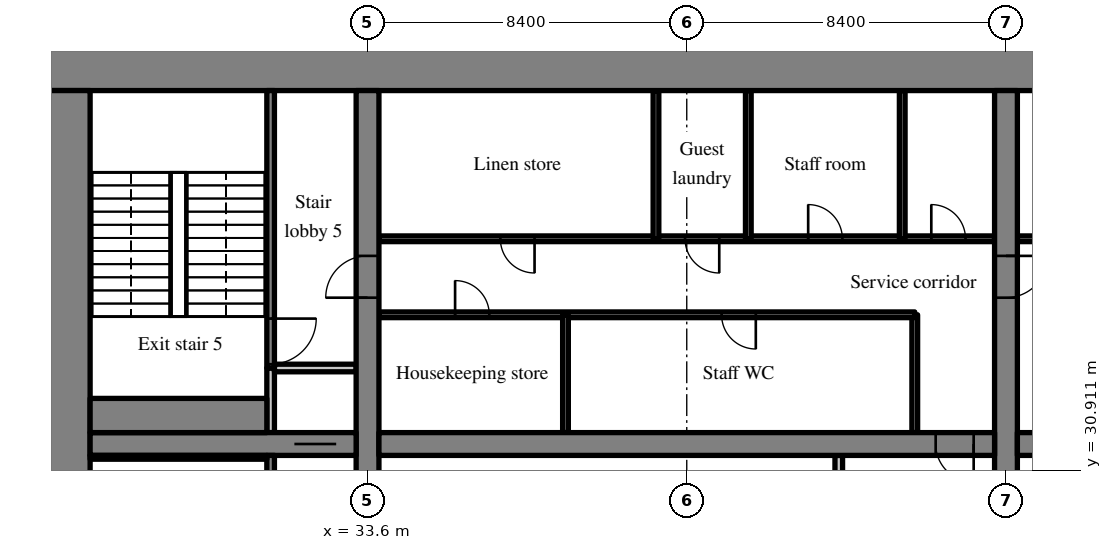
"""IFC4 building model, lengths in metres.
Left out: names, types, materials, properties, quantities, classifications, styles, units other than length and angle.
Written with IfcOpenShell. Run it as: python <this file> out.ifc"""

import sys

from ifc_helpers import new_model, si_unit, direction, frame, frame_2d, origin, place, context, subcontext, project, spatial, rectangle, extrude, source, transform, mapped, element, fill, save


model = new_model("IFC4")
c1 = context("Model", 3, precision=1e-05, world=origin(), true_north=direction((0.0, 1.0)))
c2 = subcontext(c1, "Body", "Model", "MODEL_VIEW")
j1 = project(units=[si_unit("LENGTHUNIT", "METRE"), si_unit("PLANEANGLEUNIT", "RADIAN")], contexts=[c1])
p1 = place(None, origin())
s1 = spatial("IfcSite", under=j1, at=p1, CompositionType="ELEMENT")
p2 = place(p1, origin())
s2 = spatial("IfcBuilding", under=s1, at=p2, CompositionType="ELEMENT")
p3 = place(p2, frame((0.0, 0.0, 11.4)))
s3 = spatial("IfcBuildingStorey", under=s2, at=p3, CompositionType="ELEMENT", Elevation=11.4)
m1 = source(origin(), c2, "Body", "SweptSolid", [
    extrude(rectangle(XDim=50.4, YDim=1.1, at=frame_2d((25.2, 0.0))), origin(), (0.0, 0.0, 1.0), 6.32),
])
p4 = place(p3, frame((25.2, 41.45, 0.0), z_axis=(0.0, 0.0, 1.0), x_axis=(1.0, 0.0, 0.0)))
e1 = element("IfcWall", 1, at=p4, inside=s3, PredefinedType="SHEAR", context=c2, shape_type="MappedRepresentation", body=[
    mapped(m1, transform((0.0, 0.0, 0.0), scale=1.0)),
])
m2 = source(origin(), c2, "Body", "SweptSolid", [
    extrude(rectangle(XDim=17.8, YDim=1.1, at=frame_2d((8.9, 0.0))), origin(), (0.0, 0.0, 1.0), 6.32),
])
p5 = place(p3, frame((25.75, 23.1, 0.0), z_axis=(0.0, 0.0, 1.0), x_axis=(0.0, 1.0, 0.0)))
e2 = element("IfcWall", 2, at=p5, inside=s3, PredefinedType="SHEAR", context=c2, shape_type="MappedRepresentation", body=[
    mapped(m2, transform((0.0, 0.0, 0.0), scale=1.0)),
])
m3 = source(origin(), c2, "Body", "SweptSolid", [
    extrude(rectangle(XDim=17.8, YDim=0.6, at=frame_2d((8.9, 0.0))), origin(), (0.0, 0.0, 1.0), 6.32),
])
p6 = place(p3, frame((33.6, 23.1, 0.0), z_axis=(0.0, 0.0, 1.0), x_axis=(0.0, 1.0, 0.0)))
e3 = element("IfcWall", 3, at=p6, inside=s3, PredefinedType="SHEAR", context=c2, shape_type="MappedRepresentation", body=[
    mapped(m3, transform((0.0, 0.0, 0.0), scale=1.0)),
])
m4 = source(origin(), c2, "Body", "SweptSolid", [
    extrude(rectangle(XDim=1.1, YDim=2.1, at=frame_2d((0.55, 1.05))), frame((0.0, 0.31, 0.0), z_axis=(0.0, -1.0, 0.0), x_axis=(1.0, 0.0, 0.0)), (0.0, 0.0, 1.0), 0.62),
])
p7 = place(p6, frame((12.35, 0.0, 0.0)))
e4 = element("IfcOpeningElement", 4, at=p7, cuts=e3, PredefinedType="OPENING", context=c2, shape_type="MappedRepresentation", body=[
    mapped(m4, transform((0.0, 0.0, 0.0), scale=1.0)),
])
p8 = place(p3, frame((50.4, 23.1, 0.0), z_axis=(0.0, 0.0, 1.0), x_axis=(0.0, 1.0, 0.0)))
e5 = element("IfcWall", 5, at=p8, inside=s3, PredefinedType="SHEAR", context=c2, shape_type="MappedRepresentation", body=[
    mapped(m3, transform((0.0, 0.0, 0.0), scale=1.0)),
])
p9 = place(p8, frame((12.35, 0.0, 0.0)))
e6 = element("IfcOpeningElement", 6, at=p9, cuts=e5, PredefinedType="OPENING", context=c2, shape_type="MappedRepresentation", body=[
    mapped(m4, transform((0.0, 0.0, 0.0), scale=1.0)),
])
m5 = source(origin(), c2, "Body", "SweptSolid", [
    extrude(rectangle(XDim=7.0, YDim=0.6, at=frame_2d((3.5, 0.0))), origin(), (0.0, 0.0, 1.0), 6.32),
])
p10 = place(p3, frame((26.3, 31.6, 0.0), z_axis=(0.0, 0.0, 1.0), x_axis=(1.0, 0.0, 0.0)))
e7 = element("IfcWall", 7, at=p10, inside=s3, PredefinedType="SHEAR", context=c2, shape_type="MappedRepresentation", body=[
    mapped(m5, transform((0.0, 0.0, 0.0), scale=1.0)),
])
p11 = place(p10, frame((5.375, 0.0, 0.0)))
e8 = element("IfcOpeningElement", 8, at=p11, cuts=e7, PredefinedType="OPENING", context=c2, shape_type="MappedRepresentation", body=[
    mapped(m4, transform((0.0, 0.0, 0.0), scale=1.0)),
])
m6 = source(origin(), c2, "Body", "SweptSolid", [
    extrude(rectangle(XDim=16.2, YDim=0.6, at=frame_2d((8.1, 0.0))), origin(), (0.0, 0.0, 1.0), 6.32),
])
p12 = place(p3, frame((33.9, 31.6, 0.0), z_axis=(0.0, 0.0, 1.0), x_axis=(1.0, 0.0, 0.0)))
e9 = element("IfcWall", 9, at=p12, inside=s3, PredefinedType="SHEAR", context=c2, shape_type="MappedRepresentation", body=[
    mapped(m6, transform((0.0, 0.0, 0.0), scale=1.0)),
])
m7 = source(origin(), c2, "Body", "SweptSolid", [
    extrude(rectangle(XDim=1.0, YDim=2.1, at=frame_2d((0.5, 1.05))), frame((0.0, 0.31, 0.0), z_axis=(0.0, -1.0, 0.0), x_axis=(1.0, 0.0, 0.0)), (0.0, 0.0, 1.0), 0.62),
])
p13 = place(p12, frame((14.65, 0.0, 0.0)))
e10 = element("IfcOpeningElement", 10, at=p13, cuts=e9, PredefinedType="OPENING", context=c2, shape_type="MappedRepresentation", body=[
    mapped(m7, transform((0.0, 0.0, 0.0), scale=1.0)),
])
m8 = source(origin(), c2, "Body", "SweptSolid", [
    extrude(rectangle(XDim=16.2, YDim=0.6, at=frame_2d((8.1, 0.0))), origin(), (0.0, 0.0, 1.0), 6.32),
])
p14 = place(p3, frame((50.7, 31.6, 0.0), z_axis=(0.0, 0.0, 1.0), x_axis=(1.0, 0.0, 0.0)))
e11 = element("IfcWall", 11, at=p14, inside=s3, PredefinedType="SHEAR", context=c2, shape_type="MappedRepresentation", body=[
    mapped(m8, transform((0.0, 0.0, 0.0), scale=1.0)),
])
p15 = place(p14, frame((0.55, 0.0, 0.0)))
e12 = element("IfcOpeningElement", 12, at=p15, cuts=e11, PredefinedType="OPENING", context=c2, shape_type="MappedRepresentation", body=[
    mapped(m7, transform((0.0, 0.0, 0.0), scale=1.0)),
])
m9 = source(origin(), c2, "Body", "SweptSolid", [
    extrude(rectangle(XDim=2.5, YDim=0.2, at=frame_2d((1.25, 0.0))), origin(), (0.0, 0.0, 1.0), 6.32),
])
p16 = place(p3, frame((46.0, 28.8, 0.0), z_axis=(0.0, 0.0, 1.0), x_axis=(0.0, 1.0, 0.0)))
e13 = element("IfcWall", 13, at=p16, inside=s3, PredefinedType="SOLIDWALL", context=c2, shape_type="MappedRepresentation", body=[
    mapped(m9, transform((0.0, 0.0, 0.0), scale=1.0)),
])
m10 = source(origin(), c2, "Body", "SweptSolid", [
    extrude(rectangle(XDim=3.1, YDim=0.15, at=frame_2d((1.55, 0.0))), origin(), (0.0, 0.0, 1.0), 6.32),
])
p17 = place(p3, frame((48.0, 31.9, 0.0), z_axis=(0.0, 0.0, 1.0), x_axis=(0.0, 1.0, 0.0)))
e14 = element("IfcWall", 14, at=p17, inside=s3, PredefinedType="PARTITIONING", context=c2, shape_type="MappedRepresentation", body=[
    mapped(m10, transform((0.0, 0.0, 0.0), scale=1.0)),
])
m11 = source(origin(), c2, "Body", "SweptSolid", [
    extrude(rectangle(XDim=14.1, YDim=0.15, at=frame_2d((7.05, 0.0))), origin(), (0.0, 0.0, 1.0), 6.32),
])
p18 = place(p3, frame((33.9, 35.0, 0.0), z_axis=(0.0, 0.0, 1.0), x_axis=(1.0, 0.0, 0.0)))
e15 = element("IfcWall", 15, at=p18, inside=s3, PredefinedType="PARTITIONING", context=c2, shape_type="MappedRepresentation", body=[
    mapped(m11, transform((0.0, 0.0, 0.0), scale=1.0)),
])
m12 = source(origin(), c2, "Body", "SweptSolid", [
    extrude(rectangle(XDim=0.9, YDim=2.1, at=frame_2d((0.45, 1.05))), frame((0.0, 0.085, 0.0), z_axis=(0.0, -1.0, 0.0), x_axis=(1.0, 0.0, 0.0)), (0.0, 0.0, 1.0), 0.17),
])
p19 = place(p18, frame((2.004, 0.0, 0.0)))
e16 = element("IfcOpeningElement", 16, at=p19, cuts=e15, PredefinedType="OPENING", context=c2, shape_type="MappedRepresentation", body=[
    mapped(m12, transform((0.0, 0.0, 0.0), scale=1.0)),
])
p20 = place(p18, frame((9.017, 0.0, 0.0)))
e17 = element("IfcOpeningElement", 17, at=p20, cuts=e15, PredefinedType="OPENING", context=c2, shape_type="MappedRepresentation", body=[
    mapped(m12, transform((0.0, 0.0, 0.0), scale=1.0)),
])
m13 = source(origin(), c2, "Body", "SweptSolid", [
    extrude(rectangle(XDim=16.2, YDim=0.15, at=frame_2d((8.1, 0.0))), origin(), (0.0, 0.0, 1.0), 6.32),
])
p21 = place(p3, frame((33.9, 37.0, 0.0), z_axis=(0.0, 0.0, 1.0), x_axis=(1.0, 0.0, 0.0)))
e18 = element("IfcWall", 18, at=p21, inside=s3, PredefinedType="PARTITIONING", context=c2, shape_type="MappedRepresentation", body=[
    mapped(m13, transform((0.0, 0.0, 0.0), scale=1.0)),
])
p22 = place(p21, frame((3.195, 0.0, 0.0)))
e19 = element("IfcOpeningElement", 19, at=p22, cuts=e18, PredefinedType="OPENING", context=c2, shape_type="MappedRepresentation", body=[
    mapped(m12, transform((0.0, 0.0, 0.0), scale=1.0)),
])
p23 = place(p21, frame((8.055, 0.0, 0.0)))
e20 = element("IfcOpeningElement", 20, at=p23, cuts=e18, PredefinedType="OPENING", context=c2, shape_type="MappedRepresentation", body=[
    mapped(m12, transform((0.0, 0.0, 0.0), scale=1.0)),
])
p24 = place(p21, frame((11.295, 0.0, 0.0)))
e21 = element("IfcOpeningElement", 21, at=p24, cuts=e18, PredefinedType="OPENING", context=c2, shape_type="MappedRepresentation", body=[
    mapped(m12, transform((0.0, 0.0, 0.0), scale=1.0)),
])
p25 = place(p21, frame((14.535, 0.0, 0.0)))
e22 = element("IfcOpeningElement", 22, at=p25, cuts=e18, PredefinedType="OPENING", context=c2, shape_type="MappedRepresentation", body=[
    mapped(m12, transform((0.0, 0.0, 0.0), scale=1.0)),
])
p26 = place(p3, frame((38.809, 31.9, 0.0), z_axis=(0.0, 0.0, 1.0), x_axis=(0.0, 1.0, 0.0)))
e23 = element("IfcWall", 23, at=p26, inside=s3, PredefinedType="PARTITIONING", context=c2, shape_type="MappedRepresentation", body=[
    mapped(m10, transform((0.0, 0.0, 0.0), scale=1.0)),
])
m14 = source(origin(), c2, "Body", "SweptSolid", [
    extrude(rectangle(XDim=3.9, YDim=0.15, at=frame_2d((1.95, 0.0))), origin(), (0.0, 0.0, 1.0), 6.32),
])
for number, where, z_axis, x_axis in (
    (24, (41.19, 37.0, 0.0), (0.0, 0.0, 1.0), (0.0, 1.0, 0.0)),
    (25, (43.62, 37.0, 0.0), (0.0, 0.0, 1.0), (0.0, 1.0, 0.0)),
    (26, (47.67, 37.0, 0.0), (0.0, 0.0, 1.0), (0.0, 1.0, 0.0)),
):
    element("IfcWall", number, at=place(p3, frame(where, z_axis=z_axis, x_axis=x_axis)), inside=s3, PredefinedType="PARTITIONING", context=c2, shape_type="MappedRepresentation", body=[
        mapped(m14, transform((0.0, 0.0, 0.0), scale=1.0)),
    ])
m15 = source(origin(), c2, "Body", "SweptSolid", [
    extrude(rectangle(XDim=16.2, YDim=0.15, at=frame_2d((8.1, 0.0))), origin(), (0.0, 0.0, 1.0), 6.32),
])
p27 = place(p3, frame((66.9, 37.0, 0.0), z_axis=(0.0, 0.0, 1.0), x_axis=(-1.0, 0.0, 0.0)))
e27 = element("IfcWall", 27, at=p27, inside=s3, PredefinedType="PARTITIONING", context=c2, shape_type="MappedRepresentation", body=[
    mapped(m15, transform((0.0, 0.0, 0.0), scale=1.0)),
])
p28 = place(p27, frame((0.765, 0.0, 0.0)))
e28 = element("IfcOpeningElement", 28, at=p28, cuts=e27, PredefinedType="OPENING", context=c2, shape_type="MappedRepresentation", body=[
    mapped(m12, transform((0.0, 0.0, 0.0), scale=1.0)),
])
p29 = place(p27, frame((3.6, 0.0, 0.0)))
e29 = element("IfcOpeningElement", 29, at=p29, cuts=e27, PredefinedType="OPENING", context=c2, shape_type="MappedRepresentation", body=[
    mapped(m12, transform((0.0, 0.0, 0.0), scale=1.0)),
])
p30 = place(p27, frame((9.27, 0.0, 0.0)))
e30 = element("IfcOpeningElement", 30, at=p30, cuts=e27, PredefinedType="OPENING", context=c2, shape_type="MappedRepresentation", body=[
    mapped(m12, transform((0.0, 0.0, 0.0), scale=1.0)),
])
p31 = place(p27, frame((14.535, 0.0, 0.0)))
e31 = element("IfcOpeningElement", 31, at=p31, cuts=e27, PredefinedType="OPENING", context=c2, shape_type="MappedRepresentation", body=[
    mapped(m12, transform((0.0, 0.0, 0.0), scale=1.0)),
])
m16 = source(origin(), c2, "Body", "SweptSolid", [
    extrude(rectangle(XDim=8.2, YDim=0.2, at=frame_2d((4.1, 0.0))), origin(), (0.0, 0.0, 1.0), 6.32),
])
p32 = place(p3, frame((31.05, 23.1, 0.0), z_axis=(0.0, 0.0, 1.0), x_axis=(0.0, 1.0, 0.0)))
e32 = element("IfcWall", 32, at=p32, inside=s3, PredefinedType="SOLIDWALL", context=c2, shape_type="MappedRepresentation", body=[
    mapped(m16, transform((0.0, 0.0, 0.0), scale=1.0)),
])
m17 = source(origin(), c2, "Body", "SweptSolid", [
    extrude(rectangle(XDim=1.2, YDim=2.1, at=frame_2d((0.6, 1.05))), frame((0.0, 0.11, 0.0), z_axis=(0.0, -1.0, 0.0), x_axis=(1.0, 0.0, 0.0)), (0.0, 0.0, 1.0), 0.22),
])
p33 = place(p32, frame((0.5, 0.0, 0.0)))
e33 = element("IfcOpeningElement", 33, at=p33, cuts=e32, PredefinedType="OPENING", context=c2, shape_type="MappedRepresentation", body=[
    mapped(m17, transform((0.0, 0.0, 0.0), scale=1.0)),
])
m18 = source(origin(), c2, "Body", "SweptSolid", [
    extrude(rectangle(XDim=1.7, YDim=0.2, at=frame_2d((0.85, 0.0))), origin(), (0.0, 0.0, 1.0), 6.32),
])
p34 = place(p3, frame((31.05, 31.9, 0.0), z_axis=(0.0, 0.0, 1.0), x_axis=(0.0, 1.0, 0.0)))
e34 = element("IfcWall", 34, at=p34, inside=s3, PredefinedType="SOLIDWALL", context=c2, shape_type="MappedRepresentation", body=[
    mapped(m18, transform((0.0, 0.0, 0.0), scale=1.0)),
])
m19 = source(origin(), c2, "Body", "SweptSolid", [
    extrude(rectangle(XDim=2.15, YDim=0.2, at=frame_2d((1.075, 0.0))), origin(), (0.0, 0.0, 1.0), 6.32),
])
p35 = place(p3, frame((31.15, 33.6, 0.0), z_axis=(0.0, 0.0, 1.0), x_axis=(1.0, 0.0, 0.0)))
e35 = element("IfcWall", 35, at=p35, inside=s3, PredefinedType="SOLIDWALL", context=c2, shape_type="MappedRepresentation", body=[
    mapped(m19, transform((0.0, 0.0, 0.0), scale=1.0)),
])
m20 = source(origin(), c2, "Body", "SweptSolid", [
    extrude(rectangle(XDim=7.3, YDim=0.2, at=frame_2d((3.65, 0.0))), origin(), (0.0, 0.0, 1.0), 6.32),
])
p36 = place(p3, frame((31.05, 33.6, 0.0), z_axis=(0.0, 0.0, 1.0), x_axis=(0.0, 1.0, 0.0)))
e36 = element("IfcWall", 36, at=p36, inside=s3, PredefinedType="SOLIDWALL", context=c2, shape_type="MappedRepresentation", body=[
    mapped(m20, transform((0.0, 0.0, 0.0), scale=1.0)),
])
p37 = place(p36, frame((0.1, 0.0, 0.0)))
e37 = element("IfcOpeningElement", 37, at=p37, cuts=e36, PredefinedType="OPENING", context=c2, shape_type="MappedRepresentation", body=[
    mapped(m17, transform((0.0, 0.0, 0.0), scale=1.0)),
])
m21 = source(origin(), c2, "Body", "SweptSolid", [
    extrude(rectangle(XDim=4.65, YDim=0.1, at=frame_2d((2.325, 0.0))), origin(), (0.0, 0.0, 1.0), 6.32),
])
p38 = place(p3, frame((26.3, 31.25, 0.0), z_axis=(0.0, 0.0, 1.0), x_axis=(1.0, 0.0, 0.0)))
e38 = element("IfcWall", 38, at=p38, inside=s3, PredefinedType="SOLIDWALL", context=c2, shape_type="MappedRepresentation", body=[
    mapped(m21, transform((0.0, 0.0, 0.0), scale=1.0)),
])
m22 = source(origin(), c2, "Body", "SweptSolid", [
    extrude(rectangle(XDim=4.65, YDim=0.9, at=frame_2d((2.325, 0.0))), origin(), (0.0, 0.0, 1.0), 6.32),
])
p39 = place(p3, frame((26.3, 32.35, 0.0), z_axis=(0.0, 0.0, 1.0), x_axis=(1.0, 0.0, 0.0)))
e39 = element("IfcWall", 39, at=p39, inside=s3, PredefinedType="SOLIDWALL", context=c2, shape_type="MappedRepresentation", body=[
    mapped(m22, transform((0.0, 0.0, 0.0), scale=1.0)),
])
m23 = source(origin(), c2, "Body", "SweptSolid", [
    extrude(rectangle(XDim=1.0, YDim=2.1, at=frame_2d((0.5, 1.05))), frame((0.0, 0.025, 0.0), z_axis=(0.0, -1.0, 0.0), x_axis=(1.0, 0.0, 0.0)), (0.0, 0.0, 1.0), 0.05),
])
p40 = place(p13, origin())
e40 = element("IfcDoor", 40, at=p40, inside=s3, OperationType="SINGLE_SWING_RIGHT", PredefinedType="DOOR", context=c2, shape_type="MappedRepresentation", body=[
    mapped(m23, transform((0.0, 0.0, 0.0), scale=1.0)),
])
fill(e10, e40)
m24 = source(origin(), c2, "Body", "SweptSolid", [
    extrude(rectangle(XDim=0.9, YDim=2.1, at=frame_2d((0.45, 1.05))), frame((0.0, 0.025, 0.0), z_axis=(0.0, -1.0, 0.0), x_axis=(1.0, 0.0, 0.0)), (0.0, 0.0, 1.0), 0.05),
])
p41 = place(p19, origin())
e41 = element("IfcDoor", 41, at=p41, inside=s3, OperationType="SINGLE_SWING_LEFT", PredefinedType="DOOR", context=c2, shape_type="MappedRepresentation", body=[
    mapped(m24, transform((0.0, 0.0, 0.0), scale=1.0)),
])
fill(e16, e41)
p42 = place(p20, origin())
e42 = element("IfcDoor", 42, at=p42, inside=s3, OperationType="SINGLE_SWING_RIGHT", PredefinedType="DOOR", context=c2, shape_type="MappedRepresentation", body=[
    mapped(m24, transform((0.0, 0.0, 0.0), scale=1.0)),
])
fill(e17, e42)
p43 = place(p22, origin())
e43 = element("IfcDoor", 43, at=p43, inside=s3, OperationType="SINGLE_SWING_RIGHT", PredefinedType="DOOR", context=c2, shape_type="MappedRepresentation", body=[
    mapped(m24, transform((0.0, 0.0, 0.0), scale=1.0)),
])
fill(e19, e43)
p44 = place(p23, origin())
e44 = element("IfcDoor", 44, at=p44, inside=s3, OperationType="SINGLE_SWING_RIGHT", PredefinedType="DOOR", context=c2, shape_type="MappedRepresentation", body=[
    mapped(m24, transform((0.0, 0.0, 0.0), scale=1.0)),
])
fill(e20, e44)
p45 = place(p24, origin())
e45 = element("IfcDoor", 45, at=p45, inside=s3, OperationType="SINGLE_SWING_LEFT", PredefinedType="DOOR", context=c2, shape_type="MappedRepresentation", body=[
    mapped(m24, transform((0.0, 0.0, 0.0), scale=1.0)),
])
fill(e21, e45)
p46 = place(p25, origin())
e46 = element("IfcDoor", 46, at=p46, inside=s3, OperationType="SINGLE_SWING_LEFT", PredefinedType="DOOR", context=c2, shape_type="MappedRepresentation", body=[
    mapped(m24, transform((0.0, 0.0, 0.0), scale=1.0)),
])
fill(e22, e46)
m25 = source(origin(), c2, "Body", "SweptSolid", [
    extrude(rectangle(XDim=1.1, YDim=2.1, at=frame_2d((0.55, 1.05))), frame((0.0, 0.025, 0.0), z_axis=(0.0, -1.0, 0.0), x_axis=(1.0, 0.0, 0.0)), (0.0, 0.0, 1.0), 0.05),
])
p47 = place(p11, origin())
e47 = element("IfcDoor", 47, at=p47, inside=s3, OperationType="SLIDING_TO_RIGHT", PredefinedType="DOOR", context=c2, shape_type="MappedRepresentation", body=[
    mapped(m25, transform((0.0, 0.0, 0.0), scale=1.0)),
])
fill(e8, e47)
m26 = source(origin(), c2, "Body", "SweptSolid", [
    extrude(rectangle(XDim=1.2, YDim=2.1, at=frame_2d((0.6, 1.05))), frame((0.0, 0.025, 0.0), z_axis=(0.0, -1.0, 0.0), x_axis=(1.0, 0.0, 0.0)), (0.0, 0.0, 1.0), 0.05),
])
p48 = place(p37, origin())
e48 = element("IfcDoor", 48, at=p48, inside=s3, OperationType="SINGLE_SWING_RIGHT", PredefinedType="DOOR", context=c2, shape_type="MappedRepresentation", body=[
    mapped(m26, transform((0.0, 0.0, 0.0), scale=1.0)),
])
fill(e37, e48)
p49 = place(p7, origin())
e49 = element("IfcDoor", 49, at=p49, inside=s3, OperationType="SINGLE_SWING_LEFT", PredefinedType="DOOR", context=c2, shape_type="MappedRepresentation", body=[
    mapped(m25, transform((0.0, 0.0, 0.0), scale=1.0)),
])
fill(e4, e49)
p50 = place(p9, origin())
e50 = element("IfcDoor", 50, at=p50, inside=s3, OperationType="SINGLE_SWING_RIGHT", PredefinedType="DOOR", context=c2, shape_type="MappedRepresentation", body=[
    mapped(m25, transform((0.0, 0.0, 0.0), scale=1.0)),
])
fill(e6, e50)
save(model, sys.argv[1])
